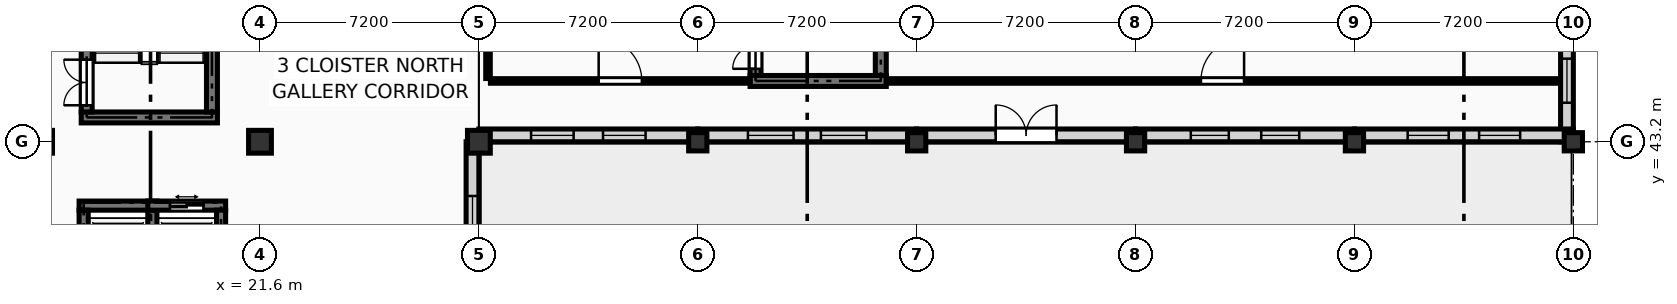
"""IFC4 building model, lengths in metres.
Left out: names, types, materials, properties, quantities, classifications, styles, units other than length and angle.
Written with IfcOpenShell. Run it as: python <this file> out.ifc"""

import sys

from ifc_helpers import new_model, si_unit, direction, frame, frame_2d, origin, origin_2d, place, context, subcontext, project, spatial, rectangle, extrude, element, fill, save


model = new_model("IFC4")
c1 = context("Model", 3, precision=1e-05, world=origin(), true_north=direction((0.0, 1.0)))
c2 = subcontext(c1, "Body", "Model", "MODEL_VIEW")
j1 = project(units=[si_unit("LENGTHUNIT", "METRE"), si_unit("PLANEANGLEUNIT", "RADIAN")], contexts=[c1])
p1 = place(None, origin())
s1 = spatial("IfcSite", under=j1, at=p1, CompositionType="ELEMENT")
p2 = place(p1, origin())
s2 = spatial("IfcBuilding", under=s1, at=p2, CompositionType="ELEMENT")
p3 = place(p2, origin())
s3 = spatial("IfcBuildingStorey", under=s2, at=p3, CompositionType="ELEMENT", Elevation=0.0)
for number, where, z_axis, x_axis in (
    (1, (14.4, 43.2, 0.0), (0.0, 0.0, 1.0), (1.0, 0.0, 0.0)),
    (2, (21.6, 43.2, 0.0), (0.0, 0.0, 1.0), (1.0, 0.0, 0.0)),
    (3, (28.8, 43.2, 0.0), (0.0, 0.0, 1.0), (1.0, 0.0, 0.0)),
):
    element("IfcColumn", number, at=place(p3, frame(where, z_axis=z_axis, x_axis=x_axis)), inside=s3, PredefinedType="COLUMN", context=c2, shape_type="SweptSolid", body=[
        extrude(rectangle(XDim=0.75, YDim=0.75, at=origin_2d()), origin(), (0.0, 0.0, 1.0), 4.5),
    ])
for number, where, z_axis, x_axis in (
    (4, (36.0, 43.2, 0.0), (0.0, 0.0, 1.0), (1.0, 0.0, 0.0)),
    (5, (43.2, 43.2, 0.0), (0.0, 0.0, 1.0), (1.0, 0.0, 0.0)),
    (6, (50.4, 43.2, 0.0), (0.0, 0.0, 1.0), (1.0, 0.0, 0.0)),
    (7, (57.6, 43.2, 0.0), (0.0, 0.0, 1.0), (1.0, 0.0, 0.0)),
    (8, (64.8, 43.2, 0.0), (0.0, 0.0, 1.0), (1.0, 0.0, 0.0)),
):
    element("IfcColumn", number, at=place(p3, frame(where, z_axis=z_axis, x_axis=x_axis)), inside=s3, PredefinedType="COLUMN", context=c2, shape_type="SweptSolid", body=[
        extrude(rectangle(XDim=0.6, YDim=0.6, at=origin_2d()), origin(), (0.0, 0.0, 1.0), 4.5),
    ])
p4 = place(p3, frame((64.59, 43.2, 0.0), z_axis=(0.0, 0.0, 1.0), x_axis=(0.0, 1.0, 0.0)))
e9 = element("IfcWall", 9, at=p4, inside=s3, PredefinedType="SOLIDWALL", context=c2, shape_type="SweptSolid", body=[
    extrude(rectangle(XDim=6.0, YDim=0.42, at=frame_2d((3.0, 0.0))), origin(), (0.0, 0.0, 1.0), 3.62),
])
p5 = place(p4, frame((1.283, 0.0, 0.45)))
e10 = element("IfcOpeningElement", 10, at=p5, cuts=e9, PredefinedType="OPENING", context=c2, shape_type="SweptSolid", body=[
    extrude(rectangle(XDim=1.45, YDim=2.8, at=frame_2d((0.725, 1.4))), frame((0.0, 0.222, 0.0), z_axis=(0.0, -1.0, 0.0), x_axis=(1.0, 0.0, 0.0)), (0.0, 0.0, 1.0), 0.444),
])
p6 = place(p4, frame((3.267, 0.0, 0.45)))
e11 = element("IfcOpeningElement", 11, at=p6, cuts=e9, PredefinedType="OPENING", context=c2, shape_type="SweptSolid", body=[
    extrude(rectangle(XDim=1.45, YDim=2.8, at=frame_2d((0.725, 1.4))), frame((0.0, 0.222, 0.0), z_axis=(0.0, -1.0, 0.0), x_axis=(1.0, 0.0, 0.0)), (0.0, 0.0, 1.0), 0.444),
])
p7 = place(p3, frame((57.6, 43.41, 0.0), z_axis=(0.0, 0.0, 1.0), x_axis=(1.0, 0.0, 0.0)))
e12 = element("IfcWall", 12, at=p7, inside=s3, PredefinedType="SOLIDWALL", context=c2, shape_type="SweptSolid", body=[
    extrude(rectangle(XDim=7.2, YDim=0.42, at=frame_2d((3.6, 0.0))), origin(), (0.0, 0.0, 1.0), 3.62),
])
p8 = place(p7, frame((1.75, 0.0, 0.45)))
e13 = element("IfcOpeningElement", 13, at=p8, cuts=e12, PredefinedType="OPENING", context=c2, shape_type="SweptSolid", body=[
    extrude(rectangle(XDim=1.35, YDim=2.75, at=frame_2d((0.675, 1.375))), frame((0.0, 0.222, 0.0), z_axis=(0.0, -1.0, 0.0), x_axis=(1.0, 0.0, 0.0)), (0.0, 0.0, 1.0), 0.444),
])
p9 = place(p7, frame((4.1, 0.0, 0.45)))
e14 = element("IfcOpeningElement", 14, at=p9, cuts=e12, PredefinedType="OPENING", context=c2, shape_type="SweptSolid", body=[
    extrude(rectangle(XDim=1.35, YDim=2.75, at=frame_2d((0.675, 1.375))), frame((0.0, 0.222, 0.0), z_axis=(0.0, -1.0, 0.0), x_axis=(1.0, 0.0, 0.0)), (0.0, 0.0, 1.0), 0.444),
])
p10 = place(p3, frame((50.4, 43.41, 0.0), z_axis=(0.0, 0.0, 1.0), x_axis=(1.0, 0.0, 0.0)))
e15 = element("IfcWall", 15, at=p10, inside=s3, PredefinedType="SOLIDWALL", context=c2, shape_type="SweptSolid", body=[
    extrude(rectangle(XDim=7.2, YDim=0.42, at=frame_2d((3.6, 0.0))), origin(), (0.0, 0.0, 1.0), 3.62),
])
p11 = place(p10, frame((1.817, 0.0, 0.45)))
e16 = element("IfcOpeningElement", 16, at=p11, cuts=e15, PredefinedType="OPENING", context=c2, shape_type="SweptSolid", body=[
    extrude(rectangle(XDim=1.25, YDim=2.7, at=frame_2d((0.625, 1.35))), frame((0.0, 0.222, 0.0), z_axis=(0.0, -1.0, 0.0), x_axis=(1.0, 0.0, 0.0)), (0.0, 0.0, 1.0), 0.444),
])
p12 = place(p10, frame((4.133, 0.0, 0.45)))
e17 = element("IfcOpeningElement", 17, at=p12, cuts=e15, PredefinedType="OPENING", context=c2, shape_type="SweptSolid", body=[
    extrude(rectangle(XDim=1.25, YDim=2.7, at=frame_2d((0.625, 1.35))), frame((0.0, 0.222, 0.0), z_axis=(0.0, -1.0, 0.0), x_axis=(1.0, 0.0, 0.0)), (0.0, 0.0, 1.0), 0.444),
])
p13 = place(p3, frame((43.2, 43.41, 0.0), z_axis=(0.0, 0.0, 1.0), x_axis=(1.0, 0.0, 0.0)))
e18 = element("IfcWall", 18, at=p13, inside=s3, PredefinedType="SOLIDWALL", context=c2, shape_type="SweptSolid", body=[
    extrude(rectangle(XDim=7.2, YDim=0.42, at=frame_2d((3.6, 0.0))), origin(), (0.0, 0.0, 1.0), 3.62),
])
p14 = place(p13, frame((2.6, 0.0, 0.0)))
e19 = element("IfcOpeningElement", 19, at=p14, cuts=e18, PredefinedType="OPENING", context=c2, shape_type="SweptSolid", body=[
    extrude(rectangle(XDim=2.0, YDim=2.4, at=frame_2d((1.0, 1.2))), frame((0.0, 0.222, 0.0), z_axis=(0.0, -1.0, 0.0), x_axis=(1.0, 0.0, 0.0)), (0.0, 0.0, 1.0), 0.444),
])
p15 = place(p3, frame((36.0, 43.41, 0.0), z_axis=(0.0, 0.0, 1.0), x_axis=(1.0, 0.0, 0.0)))
e20 = element("IfcWall", 20, at=p15, inside=s3, PredefinedType="SOLIDWALL", context=c2, shape_type="SweptSolid", body=[
    extrude(rectangle(XDim=7.2, YDim=0.42, at=frame_2d((3.6, 0.0))), origin(), (0.0, 0.0, 1.0), 3.62),
])
p16 = place(p15, frame((1.65, 0.0, 0.45)))
e21 = element("IfcOpeningElement", 21, at=p16, cuts=e20, PredefinedType="OPENING", context=c2, shape_type="SweptSolid", body=[
    extrude(rectangle(XDim=1.5, YDim=2.6, at=frame_2d((0.75, 1.3))), frame((0.0, 0.222, 0.0), z_axis=(0.0, -1.0, 0.0), x_axis=(1.0, 0.0, 0.0)), (0.0, 0.0, 1.0), 0.444),
])
p17 = place(p15, frame((4.05, 0.0, 0.45)))
e22 = element("IfcOpeningElement", 22, at=p17, cuts=e20, PredefinedType="OPENING", context=c2, shape_type="SweptSolid", body=[
    extrude(rectangle(XDim=1.5, YDim=2.6, at=frame_2d((0.75, 1.3))), frame((0.0, 0.222, 0.0), z_axis=(0.0, -1.0, 0.0), x_axis=(1.0, 0.0, 0.0)), (0.0, 0.0, 1.0), 0.444),
])
p18 = place(p3, frame((28.8, 43.41, 0.0), z_axis=(0.0, 0.0, 1.0), x_axis=(1.0, 0.0, 0.0)))
e23 = element("IfcWall", 23, at=p18, inside=s3, PredefinedType="SOLIDWALL", context=c2, shape_type="SweptSolid", body=[
    extrude(rectangle(XDim=7.2, YDim=0.42, at=frame_2d((3.6, 0.0))), origin(), (0.0, 0.0, 1.0), 3.62),
])
p19 = place(p18, frame((1.717, 0.0, 0.45)))
e24 = element("IfcOpeningElement", 24, at=p19, cuts=e23, PredefinedType="OPENING", context=c2, shape_type="SweptSolid", body=[
    extrude(rectangle(XDim=1.4, YDim=2.55, at=frame_2d((0.7, 1.275))), frame((0.0, 0.222, 0.0), z_axis=(0.0, -1.0, 0.0), x_axis=(1.0, 0.0, 0.0)), (0.0, 0.0, 1.0), 0.444),
])
p20 = place(p18, frame((4.083, 0.0, 0.45)))
e25 = element("IfcOpeningElement", 25, at=p20, cuts=e23, PredefinedType="OPENING", context=c2, shape_type="SweptSolid", body=[
    extrude(rectangle(XDim=1.4, YDim=2.55, at=frame_2d((0.7, 1.275))), frame((0.0, 0.222, 0.0), z_axis=(0.0, -1.0, 0.0), x_axis=(1.0, 0.0, 0.0)), (0.0, 0.0, 1.0), 0.444),
])
p21 = place(p3, frame((28.59, 36.0, 0.0), z_axis=(0.0, 0.0, 1.0), x_axis=(0.0, 1.0, 0.0)))
e26 = element("IfcWall", 26, at=p21, inside=s3, PredefinedType="SOLIDWALL", context=c2, shape_type="SweptSolid", body=[
    extrude(rectangle(XDim=7.2, YDim=0.42, at=frame_2d((3.6, 0.0))), origin(), (0.0, 0.0, 1.0), 3.62),
])
p22 = place(p21, frame((1.783, 0.0, 0.45)))
e27 = element("IfcOpeningElement", 27, at=p22, cuts=e26, PredefinedType="OPENING", context=c2, shape_type="SweptSolid", body=[
    extrude(rectangle(XDim=1.3, YDim=2.5, at=frame_2d((0.65, 1.25))), frame((0.0, 0.222, 0.0), z_axis=(0.0, -1.0, 0.0), x_axis=(1.0, 0.0, 0.0)), (0.0, 0.0, 1.0), 0.444),
])
p23 = place(p21, frame((4.117, 0.0, 0.45)))
e28 = element("IfcOpeningElement", 28, at=p23, cuts=e26, PredefinedType="OPENING", context=c2, shape_type="SweptSolid", body=[
    extrude(rectangle(XDim=1.3, YDim=2.5, at=frame_2d((0.65, 1.25))), frame((0.0, 0.222, 0.0), z_axis=(0.0, -1.0, 0.0), x_axis=(1.0, 0.0, 0.0)), (0.0, 0.0, 1.0), 0.444),
])
p24 = place(p3, frame((15.72, 44.0, 0.0), z_axis=(0.0, 0.0, 1.0), x_axis=(1.0, 0.0, 0.0)))
e29 = element("IfcWall", 29, at=p24, inside=s3, PredefinedType="SHEAR", context=c2, shape_type="SweptSolid", body=[
    extrude(rectangle(XDim=4.48, YDim=0.36, at=frame_2d((2.24, 0.0))), origin(), (0.0, 0.0, 1.0), 4.25),
])
p25 = place(p3, frame((15.9, 44.18, 0.0), z_axis=(0.0, 0.0, 1.0), x_axis=(0.0, 1.0, 0.0)))
e30 = element("IfcWall", 30, at=p25, inside=s3, PredefinedType="SHEAR", context=c2, shape_type="SweptSolid", body=[
    extrude(rectangle(XDim=7.24, YDim=0.36, at=frame_2d((3.62, 0.0))), origin(), (0.0, 0.0, 1.0), 4.25),
])
p26 = place(p25, frame((0.22, 0.0, 0.0)))
e31 = element("IfcOpeningElement", 31, at=p26, cuts=e30, PredefinedType="OPENING", context=c2, shape_type="SweptSolid", body=[
    extrude(rectangle(XDim=1.5, YDim=2.2, at=frame_2d((0.75, 1.1))), frame((0.0, 0.192, 0.0), z_axis=(0.0, -1.0, 0.0), x_axis=(1.0, 0.0, 0.0)), (0.0, 0.0, 1.0), 0.384),
])
p27 = place(p3, frame((20.02, 44.18, 0.0), z_axis=(0.0, 0.0, 1.0), x_axis=(0.0, 1.0, 0.0)))
e32 = element("IfcWall", 32, at=p27, inside=s3, PredefinedType="SHEAR", context=c2, shape_type="SweptSolid", body=[
    extrude(rectangle(XDim=7.24, YDim=0.36, at=frame_2d((3.62, 0.0))), origin(), (0.0, 0.0, 1.0), 4.25),
])
p28 = place(p3, frame((37.72, 45.2, 0.0), z_axis=(0.0, 0.0, 1.0), x_axis=(1.0, 0.0, 0.0)))
e33 = element("IfcWall", 33, at=p28, inside=s3, PredefinedType="SHEAR", context=c2, shape_type="SweptSolid", body=[
    extrude(rectangle(XDim=4.48, YDim=0.36, at=frame_2d((2.24, 0.0))), origin(), (0.0, 0.0, 1.0), 4.25),
])
p29 = place(p3, frame((37.9, 45.38, 0.0), z_axis=(0.0, 0.0, 1.0), x_axis=(0.0, 1.0, 0.0)))
e34 = element("IfcWall", 34, at=p29, inside=s3, PredefinedType="SHEAR", context=c2, shape_type="SweptSolid", body=[
    extrude(rectangle(XDim=7.24, YDim=0.36, at=frame_2d((3.62, 0.0))), origin(), (0.0, 0.0, 1.0), 4.25),
])
p30 = place(p29, frame((0.22, 0.0, 0.0)))
e35 = element("IfcOpeningElement", 35, at=p30, cuts=e34, PredefinedType="OPENING", context=c2, shape_type="SweptSolid", body=[
    extrude(rectangle(XDim=1.5, YDim=2.2, at=frame_2d((0.75, 1.1))), frame((0.0, 0.192, 0.0), z_axis=(0.0, -1.0, 0.0), x_axis=(1.0, 0.0, 0.0)), (0.0, 0.0, 1.0), 0.384),
])
p31 = place(p3, frame((42.02, 45.38, 0.0), z_axis=(0.0, 0.0, 1.0), x_axis=(0.0, 1.0, 0.0)))
e36 = element("IfcWall", 36, at=p31, inside=s3, PredefinedType="SHEAR", context=c2, shape_type="SweptSolid", body=[
    extrude(rectangle(XDim=7.24, YDim=0.36, at=frame_2d((3.62, 0.0))), origin(), (0.0, 0.0, 1.0), 4.25),
])
p32 = place(p3, frame((15.65, 41.1, 0.0), z_axis=(0.0, 0.0, 1.0), x_axis=(1.0, 0.0, 0.0)))
e37 = element("IfcWall", 37, at=p32, inside=s3, PredefinedType="SHEAR", context=c2, shape_type="SweptSolid", body=[
    extrude(rectangle(XDim=2.56, YDim=0.3, at=frame_2d((1.28, 0.0))), origin(), (0.0, 0.0, 1.0), 4.25),
])
p33 = place(p3, frame((15.8, 37.98, 0.0), z_axis=(0.0, 0.0, 1.0), x_axis=(0.0, 1.0, 0.0)))
e38 = element("IfcWall", 38, at=p33, inside=s3, PredefinedType="SHEAR", context=c2, shape_type="SweptSolid", body=[
    extrude(rectangle(XDim=2.97, YDim=0.3, at=frame_2d((1.485, 0.0))), origin(), (0.0, 0.0, 1.0), 4.25),
])
p34 = place(p33, frame((0.935, 0.0, 0.0)))
e39 = element("IfcOpeningElement", 39, at=p34, cuts=e38, PredefinedType="OPENING", context=c2, shape_type="SweptSolid", body=[
    extrude(rectangle(XDim=1.1, YDim=2.2, at=frame_2d((0.55, 1.1))), frame((0.0, 0.162, 0.0), z_axis=(0.0, -1.0, 0.0), x_axis=(1.0, 0.0, 0.0)), (0.0, 0.0, 1.0), 0.324),
])
p35 = place(p3, frame((18.06, 37.98, 0.0), z_axis=(0.0, 0.0, 1.0), x_axis=(0.0, 1.0, 0.0)))
e40 = element("IfcWall", 40, at=p35, inside=s3, PredefinedType="SHEAR", context=c2, shape_type="SweptSolid", body=[
    extrude(rectangle(XDim=2.97, YDim=0.3, at=frame_2d((1.485, 0.0))), origin(), (0.0, 0.0, 1.0), 4.25),
])
p36 = place(p3, frame((17.91, 41.1, 0.0), z_axis=(0.0, 0.0, 1.0), x_axis=(1.0, 0.0, 0.0)))
e41 = element("IfcWall", 41, at=p36, inside=s3, PredefinedType="SHEAR", context=c2, shape_type="SweptSolid", body=[
    extrude(rectangle(XDim=2.56, YDim=0.3, at=frame_2d((1.28, 0.0))), origin(), (0.0, 0.0, 1.0), 4.25),
])
p37 = place(p36, frame((0.73, 0.0, 0.0)))
e42 = element("IfcOpeningElement", 42, at=p37, cuts=e41, PredefinedType="OPENING", context=c2, shape_type="SweptSolid", body=[
    extrude(rectangle(XDim=1.1, YDim=2.2, at=frame_2d((0.55, 1.1))), frame((0.0, 0.162, 0.0), z_axis=(0.0, -1.0, 0.0), x_axis=(1.0, 0.0, 0.0)), (0.0, 0.0, 1.0), 0.324),
])
p38 = place(p3, frame((20.32, 37.98, 0.0), z_axis=(0.0, 0.0, 1.0), x_axis=(0.0, 1.0, 0.0)))
e43 = element("IfcWall", 43, at=p38, inside=s3, PredefinedType="SHEAR", context=c2, shape_type="SweptSolid", body=[
    extrude(rectangle(XDim=2.97, YDim=0.3, at=frame_2d((1.485, 0.0))), origin(), (0.0, 0.0, 1.0), 4.25),
])
p39 = place(p3, frame((29.1, 45.28, 0.0), z_axis=(0.0, 0.0, 1.0), x_axis=(0.0, 1.0, 0.0)))
e44 = element("IfcWall", 44, at=p39, inside=s3, PredefinedType="PARTITIONING", context=c2, shape_type="SweptSolid", body=[
    extrude(rectangle(XDim=10.64, YDim=0.15, at=frame_2d((5.32, 0.0))), origin(), (0.0, 0.0, 1.0), 3.385),
])
p40 = place(p3, frame((29.18, 45.2, 0.0), z_axis=(0.0, 0.0, 1.0), x_axis=(1.0, 0.0, 0.0)))
e45 = element("IfcWall", 45, at=p40, inside=s3, PredefinedType="PARTITIONING", context=c2, shape_type="SweptSolid", body=[
    extrude(rectangle(XDim=8.54, YDim=0.15, at=frame_2d((4.27, 0.0))), origin(), (0.0, 0.0, 1.0), 4.235),
])
p41 = place(p40, frame((3.56, 0.0, 0.0)))
e46 = element("IfcOpeningElement", 46, at=p41, cuts=e45, PredefinedType="OPENING", context=c2, shape_type="SweptSolid", body=[
    extrude(rectangle(XDim=1.42, YDim=2.22, at=frame_2d((0.71, 1.11))), frame((0.0, 0.087, 0.0), z_axis=(0.0, -1.0, 0.0), x_axis=(1.0, 0.0, 0.0)), (0.0, 0.0, 1.0), 0.174),
])
p42 = place(p3, frame((42.2, 45.2, 0.0), z_axis=(0.0, 0.0, 1.0), x_axis=(1.0, 0.0, 0.0)))
e47 = element("IfcWall", 47, at=p42, inside=s3, PredefinedType="PARTITIONING", context=c2, shape_type="SweptSolid", body=[
    extrude(rectangle(XDim=22.12, YDim=0.15, at=frame_2d((11.06, 0.0))), origin(), (0.0, 0.0, 1.0), 4.235),
])
p43 = place(p42, frame((10.35, 0.0, 0.0)))
e48 = element("IfcOpeningElement", 48, at=p43, cuts=e47, PredefinedType="OPENING", context=c2, shape_type="SweptSolid", body=[
    extrude(rectangle(XDim=1.42, YDim=2.22, at=frame_2d((0.71, 1.11))), frame((0.0, 0.087, 0.0), z_axis=(0.0, -1.0, 0.0), x_axis=(1.0, 0.0, 0.0)), (0.0, 0.0, 1.0), 0.174),
])
p44 = place(p5, origin())
e49 = element("IfcWindow", 49, at=p44, inside=s3, PartitioningType="SINGLE_PANEL", PredefinedType="WINDOW", context=c2, shape_type="SweptSolid", body=[
    extrude(rectangle(XDim=1.45, YDim=2.8, at=frame_2d((0.725, 1.4))), frame((0.0, 0.03, 0.0), z_axis=(0.0, -1.0, 0.0), x_axis=(1.0, 0.0, 0.0)), (0.0, 0.0, 1.0), 0.06),
])
fill(e10, e49)
p45 = place(p8, origin())
e50 = element("IfcWindow", 50, at=p45, inside=s3, PartitioningType="SINGLE_PANEL", PredefinedType="WINDOW", context=c2, shape_type="SweptSolid", body=[
    extrude(rectangle(XDim=1.35, YDim=2.75, at=frame_2d((0.675, 1.375))), frame((0.0, 0.03, 0.0), z_axis=(0.0, -1.0, 0.0), x_axis=(1.0, 0.0, 0.0)), (0.0, 0.0, 1.0), 0.06),
])
fill(e13, e50)
p46 = place(p9, origin())
e51 = element("IfcWindow", 51, at=p46, inside=s3, PartitioningType="SINGLE_PANEL", PredefinedType="WINDOW", context=c2, shape_type="SweptSolid", body=[
    extrude(rectangle(XDim=1.35, YDim=2.75, at=frame_2d((0.675, 1.375))), frame((0.0, 0.03, 0.0), z_axis=(0.0, -1.0, 0.0), x_axis=(1.0, 0.0, 0.0)), (0.0, 0.0, 1.0), 0.06),
])
fill(e14, e51)
p47 = place(p11, origin())
e52 = element("IfcWindow", 52, at=p47, inside=s3, PartitioningType="SINGLE_PANEL", PredefinedType="WINDOW", context=c2, shape_type="SweptSolid", body=[
    extrude(rectangle(XDim=1.25, YDim=2.7, at=frame_2d((0.625, 1.35))), frame((0.0, 0.03, 0.0), z_axis=(0.0, -1.0, 0.0), x_axis=(1.0, 0.0, 0.0)), (0.0, 0.0, 1.0), 0.06),
])
fill(e16, e52)
p48 = place(p12, origin())
e53 = element("IfcWindow", 53, at=p48, inside=s3, PartitioningType="SINGLE_PANEL", PredefinedType="WINDOW", context=c2, shape_type="SweptSolid", body=[
    extrude(rectangle(XDim=1.25, YDim=2.7, at=frame_2d((0.625, 1.35))), frame((0.0, 0.03, 0.0), z_axis=(0.0, -1.0, 0.0), x_axis=(1.0, 0.0, 0.0)), (0.0, 0.0, 1.0), 0.06),
])
fill(e17, e53)
p49 = place(p14, origin())
e54 = element("IfcDoor", 54, at=p49, inside=s3, OperationType="DOUBLE_DOOR_SINGLE_SWING", PredefinedType="DOOR", context=c2, shape_type="SweptSolid", body=[
    extrude(rectangle(XDim=2.0, YDim=2.4, at=frame_2d((1.0, 1.2))), frame((0.0, 0.025, 0.0), z_axis=(0.0, -1.0, 0.0), x_axis=(1.0, 0.0, 0.0)), (0.0, 0.0, 1.0), 0.05),
])
fill(e19, e54)
p50 = place(p16, origin())
e55 = element("IfcWindow", 55, at=p50, inside=s3, PartitioningType="SINGLE_PANEL", PredefinedType="WINDOW", context=c2, shape_type="SweptSolid", body=[
    extrude(rectangle(XDim=1.5, YDim=2.6, at=frame_2d((0.75, 1.3))), frame((0.0, 0.03, 0.0), z_axis=(0.0, -1.0, 0.0), x_axis=(1.0, 0.0, 0.0)), (0.0, 0.0, 1.0), 0.06),
])
fill(e21, e55)
p51 = place(p17, origin())
e56 = element("IfcWindow", 56, at=p51, inside=s3, PartitioningType="SINGLE_PANEL", PredefinedType="WINDOW", context=c2, shape_type="SweptSolid", body=[
    extrude(rectangle(XDim=1.5, YDim=2.6, at=frame_2d((0.75, 1.3))), frame((0.0, 0.03, 0.0), z_axis=(0.0, -1.0, 0.0), x_axis=(1.0, 0.0, 0.0)), (0.0, 0.0, 1.0), 0.06),
])
fill(e22, e56)
p52 = place(p19, origin())
e57 = element("IfcWindow", 57, at=p52, inside=s3, PartitioningType="SINGLE_PANEL", PredefinedType="WINDOW", context=c2, shape_type="SweptSolid", body=[
    extrude(rectangle(XDim=1.4, YDim=2.55, at=frame_2d((0.7, 1.275))), frame((0.0, 0.03, 0.0), z_axis=(0.0, -1.0, 0.0), x_axis=(1.0, 0.0, 0.0)), (0.0, 0.0, 1.0), 0.06),
])
fill(e24, e57)
p53 = place(p20, origin())
e58 = element("IfcWindow", 58, at=p53, inside=s3, PartitioningType="SINGLE_PANEL", PredefinedType="WINDOW", context=c2, shape_type="SweptSolid", body=[
    extrude(rectangle(XDim=1.4, YDim=2.55, at=frame_2d((0.7, 1.275))), frame((0.0, 0.03, 0.0), z_axis=(0.0, -1.0, 0.0), x_axis=(1.0, 0.0, 0.0)), (0.0, 0.0, 1.0), 0.06),
])
fill(e25, e58)
p54 = place(p23, origin())
e59 = element("IfcWindow", 59, at=p54, inside=s3, PartitioningType="SINGLE_PANEL", PredefinedType="WINDOW", context=c2, shape_type="SweptSolid", body=[
    extrude(rectangle(XDim=1.3, YDim=2.5, at=frame_2d((0.65, 1.25))), frame((0.0, 0.03, 0.0), z_axis=(0.0, -1.0, 0.0), x_axis=(1.0, 0.0, 0.0)), (0.0, 0.0, 1.0), 0.06),
])
fill(e28, e59)
p55 = place(p26, origin())
e60 = element("IfcDoor", 60, at=p55, inside=s3, OperationType="DOUBLE_DOOR_SINGLE_SWING", PredefinedType="DOOR", context=c2, shape_type="SweptSolid", body=[
    extrude(rectangle(XDim=1.5, YDim=2.2, at=frame_2d((0.75, 1.1))), frame((0.0, 0.025, 0.0), z_axis=(0.0, -1.0, 0.0), x_axis=(1.0, 0.0, 0.0)), (0.0, 0.0, 1.0), 0.05),
])
fill(e31, e60)
p56 = place(p30, origin())
e61 = element("IfcDoor", 61, at=p56, inside=s3, OperationType="DOUBLE_DOOR_SINGLE_SWING", PredefinedType="DOOR", context=c2, shape_type="SweptSolid", body=[
    extrude(rectangle(XDim=1.5, YDim=2.2, at=frame_2d((0.75, 1.1))), frame((0.0, 0.025, 0.0), z_axis=(0.0, -1.0, 0.0), x_axis=(1.0, 0.0, 0.0)), (0.0, 0.0, 1.0), 0.05),
])
fill(e35, e61)
p57 = place(p37, origin())
e62 = element("IfcDoor", 62, at=p57, inside=s3, OperationType="DOUBLE_DOOR_SLIDING", PredefinedType="DOOR", context=c2, shape_type="SweptSolid", body=[
    extrude(rectangle(XDim=1.1, YDim=2.2, at=frame_2d((0.55, 1.1))), frame((0.0, 0.025, 0.0), z_axis=(0.0, -1.0, 0.0), x_axis=(1.0, 0.0, 0.0)), (0.0, 0.0, 1.0), 0.05),
])
fill(e42, e62)
p58 = place(p41, origin())
e63 = element("IfcDoor", 63, at=p58, inside=s3, OperationType="SINGLE_SWING_LEFT", PredefinedType="DOOR", context=c2, shape_type="SweptSolid", body=[
    extrude(rectangle(XDim=1.42, YDim=2.22, at=frame_2d((0.71, 1.11))), frame((0.0, 0.025, 0.0), z_axis=(0.0, -1.0, 0.0), x_axis=(1.0, 0.0, 0.0)), (0.0, 0.0, 1.0), 0.05),
])
fill(e46, e63)
p59 = place(p43, origin())
e64 = element("IfcDoor", 64, at=p59, inside=s3, OperationType="SINGLE_SWING_RIGHT", PredefinedType="DOOR", context=c2, shape_type="SweptSolid", body=[
    extrude(rectangle(XDim=1.42, YDim=2.22, at=frame_2d((0.71, 1.11))), frame((0.0, 0.025, 0.0), z_axis=(0.0, -1.0, 0.0), x_axis=(1.0, 0.0, 0.0)), (0.0, 0.0, 1.0), 0.05),
])
fill(e48, e64)
save(model, sys.argv[1])
